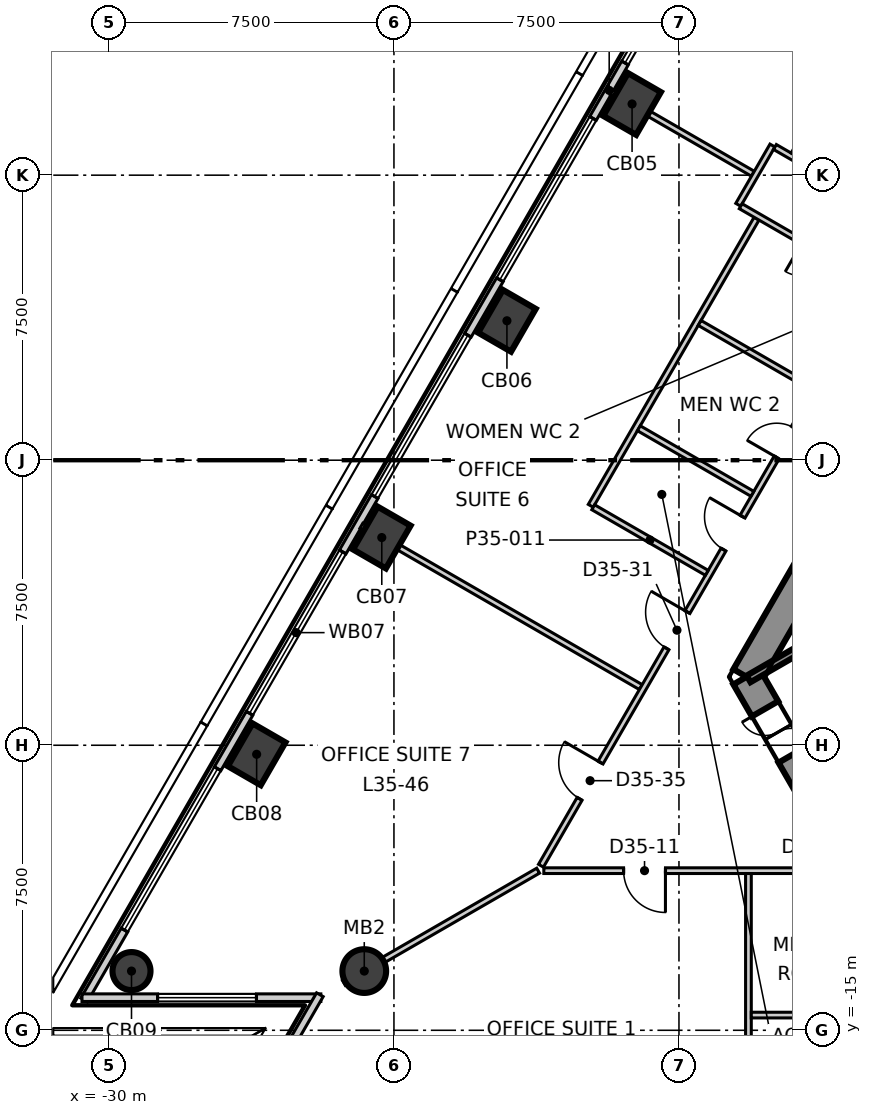
"""IFC4 building model, lengths in metres.
Left out: names, types, materials, properties, quantities, classifications, styles, units other than length and angle.
Written with IfcOpenShell. Run it as: python <this file> out.ifc"""

import sys

from ifc_helpers import new_model, si_unit, direction, frame, frame_2d, origin, origin_2d, place, context, subcontext, project, spatial, polyline, rectangle, circle, outline, extrude, element, fill, save


model = new_model("IFC4")
c1 = context("Model", 3, precision=1e-05, world=origin(), true_north=direction((0.0, 1.0)))
c2 = subcontext(c1, "Body", "Model", "MODEL_VIEW")
j1 = project(units=[si_unit("LENGTHUNIT", "METRE"), si_unit("PLANEANGLEUNIT", "RADIAN")], contexts=[c1])
p1 = place(None, origin())
s1 = spatial("IfcSite", under=j1, at=p1, CompositionType="ELEMENT")
p2 = place(p1, origin())
s2 = spatial("IfcBuilding", under=s1, at=p2, CompositionType="ELEMENT")
p3 = place(p2, frame((0.0, 0.0, 152.3)))
s3 = spatial("IfcBuildingStorey", under=s2, at=p3, CompositionType="ELEMENT", Elevation=152.3)
p4 = place(p3, frame((-1.674, 14.3, -0.3), z_axis=(0.0, 0.0, 1.0), x_axis=(-0.499995765644, -0.866027848477, 0.0)))
e1 = element("IfcWall", 1, at=p4, inside=s3, PredefinedType="SHEAR", context=c2, shape_type="SweptSolid", body=[
    extrude(outline(polyline([(-0.231, -0.4), (1.732, -0.4), (3.695, -0.4), (5.658, -0.4), (7.621, -0.4), (9.584, -0.4), (11.547, -0.4), (13.51, -0.4), (15.473, -0.4), (17.436, -0.4), (19.399, -0.4), (21.362, -0.4), (23.325, -0.4), (22.863, 0.4), (20.977, 0.4), (19.091, 0.4), (17.205, 0.4), (15.319, 0.4), (13.433, 0.4), (11.547, 0.4), (9.661, 0.4), (7.775, 0.4), (5.889, 0.4), (4.003, 0.4), (2.117, 0.4), (0.231, 0.4), (-0.231, -0.4)])), origin(), (0.0, 0.0, 1.0), 4.0),
])
p5 = place(p4, frame((10.997, 0.0, 0.3)))
e2 = element("IfcOpeningElement", 2, at=p5, cuts=e1, PredefinedType="OPENING", context=c2, shape_type="SweptSolid", body=[
    extrude(rectangle(XDim=1.1, YDim=2.1, at=frame_2d((0.55, 1.05))), frame((0.0, 0.41, 0.0), z_axis=(0.0, -1.0, 0.0), x_axis=(1.0, 0.0, 0.0)), (0.0, 0.0, 1.0), 0.82),
])
p6 = place(p4, frame((4.474, 0.0, 0.3)))
e3 = element("IfcOpeningElement", 3, at=p6, cuts=e1, PredefinedType="OPENING", context=c2, shape_type="SweptSolid", body=[
    extrude(rectangle(XDim=0.9, YDim=2.1, at=frame_2d((0.45, 1.05))), frame((0.0, 0.41, 0.0), z_axis=(0.0, -1.0, 0.0), x_axis=(1.0, 0.0, 0.0)), (0.0, 0.0, 1.0), 0.82),
])
p7 = place(p3, frame((-13.221, -5.7, -0.3), z_axis=(0.0, 0.0, 1.0), x_axis=(0.49987182685, -0.866099391942, 0.0)))
e4 = element("IfcWall", 4, at=p7, inside=s3, PredefinedType="SHEAR", context=c2, shape_type="SweptSolid", body=[
    extrude(outline(polyline([(-0.231, -0.4), (1.674, -0.4), (3.579, -0.4), (3.118, 0.4), (1.674, 0.4), (0.231, 0.4), (-0.231, -0.4)])), origin(), (0.0, 0.0, 1.0), 4.0),
])
p8 = place(p7, frame((0.974, 0.0, 0.3)))
e5 = element("IfcOpeningElement", 5, at=p8, cuts=e4, PredefinedType="OPENING", context=c2, shape_type="SweptSolid", body=[
    extrude(rectangle(XDim=1.4, YDim=2.1, at=frame_2d((0.7, 1.05))), frame((0.0, 0.41, 0.0), z_axis=(0.0, -1.0, 0.0), x_axis=(1.0, 0.0, 0.0)), (0.0, 0.0, 1.0), 0.82),
])
for number, where, z_axis, x_axis in (
    (6, (-16.234, 9.373, -0.3), (0.0, 0.0, 1.0), (0.5, 0.866, 0.0)),
    (7, (-19.527, 3.669, -0.3), (0.0, 0.0, 1.0), (0.5, 0.866, 0.0)),
    (8, (-22.82, -2.035, -0.3), (0.0, 0.0, 1.0), (0.5, 0.866, 0.0)),
    (9, (-26.113, -7.738, -0.3), (0.0, 0.0, 1.0), (0.5, 0.866, 0.0)),
):
    element("IfcColumn", number, at=place(p3, frame(where, z_axis=z_axis, x_axis=x_axis)), inside=s3, PredefinedType="COLUMN", context=c2, shape_type="SweptSolid", body=[
        extrude(rectangle(XDim=1.3, YDim=1.0, at=origin_2d()), origin(), (0.0, 0.0, 1.0), 4.0),
    ])
p9 = place(p3, frame((-29.406, -13.442, -0.3), z_axis=(0.0, 0.0, 1.0), x_axis=(0.5, 0.866025403784, 0.0)))
e10 = element("IfcColumn", 10, at=p9, inside=s3, PredefinedType="COLUMN", context=c2, shape_type="SweptSolid", body=[
    extrude(circle(Radius=0.5, at=origin_2d()), origin(), (0.0, 0.0, 1.0), 4.0),
])
p10 = place(p3, frame((-23.281, -13.442, -0.3), z_axis=(0.0, 0.0, 1.0), x_axis=(1.0, 0.0, 0.0)))
e11 = element("IfcColumn", 11, at=p10, inside=s3, PredefinedType="COLUMN", context=c2, shape_type="SweptSolid", body=[
    extrude(circle(Radius=0.575, at=origin_2d()), origin(), (0.0, 0.0, 1.0), 4.0),
])
p11 = place(p3, frame((-3.018, 33.666, 0.0), z_axis=(0.0, 0.0, 1.0), x_axis=(-0.499984613623, -0.866034286931, 0.0)))
e12 = element("IfcWall", 12, at=p11, inside=s3, PredefinedType="ELEMENTEDWALL", context=c2, shape_type="SweptSolid", body=[
    extrude(rectangle(XDim=55.274, YDim=0.2, at=frame_2d((27.637, 0.0))), origin(), (0.0, 0.0, 1.0), 3.7),
])
p12 = place(p11, frame((2.145, 0.0, 0.9)))
e13 = element("IfcOpeningElement", 13, at=p12, cuts=e12, PredefinedType="OPENING", context=c2, shape_type="SweptSolid", body=[
    extrude(rectangle(XDim=4.9, YDim=2.5, at=frame_2d((2.45, 1.25))), frame((0.0, 0.11, 0.0), z_axis=(0.0, -1.0, 0.0), x_axis=(1.0, 0.0, 0.0)), (0.0, 0.0, 1.0), 0.22),
])
p13 = place(p11, frame((8.731, 0.0, 0.9)))
e14 = element("IfcOpeningElement", 14, at=p13, cuts=e12, PredefinedType="OPENING", context=c2, shape_type="SweptSolid", body=[
    extrude(rectangle(XDim=4.9, YDim=2.5, at=frame_2d((2.45, 1.25))), frame((0.0, 0.11, 0.0), z_axis=(0.0, -1.0, 0.0), x_axis=(1.0, 0.0, 0.0)), (0.0, 0.0, 1.0), 0.22),
])
p14 = place(p11, frame((15.318, 0.0, 0.9)))
e15 = element("IfcOpeningElement", 15, at=p14, cuts=e12, PredefinedType="OPENING", context=c2, shape_type="SweptSolid", body=[
    extrude(rectangle(XDim=4.9, YDim=2.5, at=frame_2d((2.45, 1.25))), frame((0.0, 0.11, 0.0), z_axis=(0.0, -1.0, 0.0), x_axis=(1.0, 0.0, 0.0)), (0.0, 0.0, 1.0), 0.22),
])
p15 = place(p11, frame((21.904, 0.0, 0.9)))
e16 = element("IfcOpeningElement", 16, at=p15, cuts=e12, PredefinedType="OPENING", context=c2, shape_type="SweptSolid", body=[
    extrude(rectangle(XDim=4.9, YDim=2.5, at=frame_2d((2.45, 1.25))), frame((0.0, 0.11, 0.0), z_axis=(0.0, -1.0, 0.0), x_axis=(1.0, 0.0, 0.0)), (0.0, 0.0, 1.0), 0.22),
])
p16 = place(p11, frame((28.49, 0.0, 0.9)))
e17 = element("IfcOpeningElement", 17, at=p16, cuts=e12, PredefinedType="OPENING", context=c2, shape_type="SweptSolid", body=[
    extrude(rectangle(XDim=4.9, YDim=2.5, at=frame_2d((2.45, 1.25))), frame((0.0, 0.11, 0.0), z_axis=(0.0, -1.0, 0.0), x_axis=(1.0, 0.0, 0.0)), (0.0, 0.0, 1.0), 0.22),
])
p17 = place(p11, frame((35.076, 0.0, 0.9)))
e18 = element("IfcOpeningElement", 18, at=p17, cuts=e12, PredefinedType="OPENING", context=c2, shape_type="SweptSolid", body=[
    extrude(rectangle(XDim=4.9, YDim=2.5, at=frame_2d((2.45, 1.25))), frame((0.0, 0.11, 0.0), z_axis=(0.0, -1.0, 0.0), x_axis=(1.0, 0.0, 0.0)), (0.0, 0.0, 1.0), 0.22),
])
p18 = place(p11, frame((41.662, 0.0, 0.9)))
e19 = element("IfcOpeningElement", 19, at=p18, cuts=e12, PredefinedType="OPENING", context=c2, shape_type="SweptSolid", body=[
    extrude(rectangle(XDim=4.9, YDim=2.5, at=frame_2d((2.45, 1.25))), frame((0.0, 0.11, 0.0), z_axis=(0.0, -1.0, 0.0), x_axis=(1.0, 0.0, 0.0)), (0.0, 0.0, 1.0), 0.22),
])
p19 = place(p11, frame((48.248, 0.0, 0.9)))
e20 = element("IfcOpeningElement", 20, at=p19, cuts=e12, PredefinedType="OPENING", context=c2, shape_type="SweptSolid", body=[
    extrude(rectangle(XDim=4.9, YDim=2.5, at=frame_2d((2.45, 1.25))), frame((0.0, 0.11, 0.0), z_axis=(0.0, -1.0, 0.0), x_axis=(1.0, 0.0, 0.0)), (0.0, 0.0, 1.0), 0.22),
])
p20 = place(p3, frame((-30.709, -14.142, 0.0), z_axis=(0.0, 0.0, 1.0), x_axis=(1.0, 0.0, 0.0)))
e21 = element("IfcWall", 21, at=p20, inside=s3, PredefinedType="ELEMENTEDWALL", context=c2, shape_type="SweptSolid", body=[
    extrude(rectangle(XDim=6.285, YDim=0.2, at=frame_2d((3.143, 0.0))), origin(), (0.0, 0.0, 1.0), 3.7),
])
p21 = place(p20, frame((1.99, 0.0, 0.9)))
e22 = element("IfcOpeningElement", 22, at=p21, cuts=e21, PredefinedType="OPENING", context=c2, shape_type="SweptSolid", body=[
    extrude(rectangle(XDim=2.6, YDim=2.5, at=frame_2d((1.3, 1.25))), frame((0.0, 0.11, 0.0), z_axis=(0.0, -1.0, 0.0), x_axis=(1.0, 0.0, 0.0)), (0.0, 0.0, 1.0), 0.22),
])
p22 = place(p3, frame((-24.449, -14.064, 0.0), z_axis=(0.0, 0.0, 1.0), x_axis=(-0.500057556061, -0.865992171227, 0.0)))
e23 = element("IfcWall", 23, at=p22, inside=s3, PredefinedType="ELEMENTEDWALL", context=c2, shape_type="SweptSolid", body=[
    extrude(rectangle(XDim=6.285, YDim=0.2, at=frame_2d((3.143, 0.0))), origin(), (0.0, 0.0, 1.0), 3.7),
])
p23 = place(p22, frame((1.39, 0.0, 0.9)))
e24 = element("IfcOpeningElement", 24, at=p23, cuts=e23, PredefinedType="OPENING", context=c2, shape_type="SweptSolid", body=[
    extrude(rectangle(XDim=2.6, YDim=2.5, at=frame_2d((1.3, 1.25))), frame((0.0, 0.11, 0.0), z_axis=(0.0, -1.0, 0.0), x_axis=(1.0, 0.0, 0.0)), (0.0, 0.0, 1.0), 0.22),
])
p24 = place(p3, frame((-23.818, -13.752, 0.0), z_axis=(0.0, 0.0, 1.0), x_axis=(0.8659920435, 0.500057777256, 0.0)))
e25 = element("IfcWall", 25, at=p24, inside=s3, PredefinedType="PARTITIONING", context=c2, shape_type="SweptSolid", body=[
    extrude(rectangle(XDim=5.903, YDim=0.15, at=frame_2d((2.952, 0.0))), origin(), (0.0, 0.0, 1.0), 3.2),
])
p25 = place(p3, frame((-23.357, -1.725, 0.0), z_axis=(0.0, 0.0, 1.0), x_axis=(0.866045766046, -0.49996472987, 0.0)))
e26 = element("IfcWall", 26, at=p25, inside=s3, PredefinedType="PARTITIONING", context=c2, shape_type="SweptSolid", body=[
    extrude(rectangle(XDim=8.49, YDim=0.15, at=frame_2d((4.245, 0.0))), origin(), (0.0, 0.0, 1.0), 3.7),
])
p26 = place(p3, frame((-18.556, -10.8, 0.0), z_axis=(0.0, 0.0, 1.0), x_axis=(1.0, 0.0, 0.0)))
e27 = element("IfcWall", 27, at=p26, inside=s3, PredefinedType="PARTITIONING", context=c2, shape_type="SweptSolid", body=[
    extrude(rectangle(XDim=17.655, YDim=0.15, at=frame_2d((8.828, 0.0))), origin(), (0.0, 0.0, 1.0), 3.7),
])
p27 = place(p26, frame((2.1, 0.0, 0.0)))
e28 = element("IfcOpeningElement", 28, at=p27, cuts=e27, PredefinedType="OPENING", context=c2, shape_type="SweptSolid", body=[
    extrude(rectangle(XDim=1.1, YDim=2.1, at=frame_2d((0.55, 1.05))), frame((0.0, 0.085, 0.0), z_axis=(0.0, -1.0, 0.0), x_axis=(1.0, 0.0, 0.0)), (0.0, 0.0, 1.0), 0.17),
])
p28 = place(p26, frame((13.934, 0.0, 0.0)))
e29 = element("IfcOpeningElement", 29, at=p28, cuts=e27, PredefinedType="OPENING", context=c2, shape_type="SweptSolid", body=[
    extrude(rectangle(XDim=1.1, YDim=2.1, at=frame_2d((0.55, 1.05))), frame((0.0, 0.085, 0.0), z_axis=(0.0, -1.0, 0.0), x_axis=(1.0, 0.0, 0.0)), (0.0, 0.0, 1.0), 0.17),
])
p29 = place(p26, frame((6.734, 0.0, 0.0)))
e30 = element("IfcOpeningElement", 30, at=p29, cuts=e27, PredefinedType="OPENING", context=c2, shape_type="SweptSolid", body=[
    extrude(rectangle(XDim=0.9, YDim=2.1, at=frame_2d((0.45, 1.05))), frame((0.0, 0.085, 0.0), z_axis=(0.0, -1.0, 0.0), x_axis=(1.0, 0.0, 0.0)), (0.0, 0.0, 1.0), 0.17),
])
p30 = place(p26, frame((9.734, 0.0, 0.0)))
e31 = element("IfcOpeningElement", 31, at=p30, cuts=e27, PredefinedType="OPENING", context=c2, shape_type="SweptSolid", body=[
    extrude(rectangle(XDim=0.9, YDim=2.1, at=frame_2d((0.45, 1.05))), frame((0.0, 0.085, 0.0), z_axis=(0.0, -1.0, 0.0), x_axis=(1.0, 0.0, 0.0)), (0.0, 0.0, 1.0), 0.17),
])
p31 = place(p3, frame((-18.631, -10.67, 0.0), z_axis=(0.0, 0.0, 1.0), x_axis=(0.500017706633, 0.866015180614, 0.0)))
e32 = element("IfcWall", 32, at=p31, inside=s3, PredefinedType="PARTITIONING", context=c2, shape_type="SweptSolid", body=[
    extrude(rectangle(XDim=17.656, YDim=0.15, at=frame_2d((8.828, 0.0))), origin(), (0.0, 0.0, 1.0), 3.7),
])
p32 = place(p31, frame((6.606, 0.0, 0.0)))
e33 = element("IfcOpeningElement", 33, at=p32, cuts=e32, PredefinedType="OPENING", context=c2, shape_type="SweptSolid", body=[
    extrude(rectangle(XDim=1.1, YDim=2.1, at=frame_2d((0.55, 1.05))), frame((0.0, 0.085, 0.0), z_axis=(0.0, -1.0, 0.0), x_axis=(1.0, 0.0, 0.0)), (0.0, 0.0, 1.0), 0.17),
])
p33 = place(p31, frame((12.406, 0.0, 0.0)))
e34 = element("IfcOpeningElement", 34, at=p33, cuts=e32, PredefinedType="OPENING", context=c2, shape_type="SweptSolid", body=[
    extrude(rectangle(XDim=0.9, YDim=2.1, at=frame_2d((0.45, 1.05))), frame((0.0, 0.085, 0.0), z_axis=(0.0, -1.0, 0.0), x_axis=(1.0, 0.0, 0.0)), (0.0, 0.0, 1.0), 0.17),
])
p34 = place(p31, frame((9.606, 0.0, 0.0)))
e35 = element("IfcOpeningElement", 35, at=p34, cuts=e32, PredefinedType="OPENING", context=c2, shape_type="SweptSolid", body=[
    extrude(rectangle(XDim=1.0, YDim=2.1, at=frame_2d((0.5, 1.05))), frame((0.0, 0.085, 0.0), z_axis=(0.0, -1.0, 0.0), x_axis=(1.0, 0.0, 0.0)), (0.0, 0.0, 1.0), 0.17),
])
p35 = place(p31, frame((2.034, 0.0, 0.0)))
e36 = element("IfcOpeningElement", 36, at=p35, cuts=e32, PredefinedType="OPENING", context=c2, shape_type="SweptSolid", body=[
    extrude(rectangle(XDim=1.1, YDim=2.1, at=frame_2d((0.55, 1.05))), frame((0.0, 0.085, 0.0), z_axis=(0.0, -1.0, 0.0), x_axis=(1.0, 0.0, 0.0)), (0.0, 0.0, 1.0), 0.17),
])
p36 = place(p3, frame((-16.771, 9.683, 0.0), z_axis=(0.0, 0.0, 1.0), x_axis=(0.866070942811, -0.499921115796, 0.0)))
e37 = element("IfcWall", 37, at=p36, inside=s3, PredefinedType="PARTITIONING", context=c2, shape_type="SweptSolid", body=[
    extrude(rectangle(XDim=4.291, YDim=0.15, at=frame_2d((2.146, 0.0))), origin(), (0.0, 0.0, 1.0), 3.2),
])
p37 = place(p3, frame((-17.321, -1.2, 0.0), z_axis=(0.0, 0.0, 1.0), x_axis=(0.500054279689, 0.865994063124, 0.0)))
e38 = element("IfcWall", 38, at=p37, inside=s3, PredefinedType="PARTITIONING", context=c2, shape_type="SweptSolid", body=[
    extrude(rectangle(XDim=8.725, YDim=0.15, at=frame_2d((4.363, 0.0))), origin(), (0.0, 0.0, 1.0), 3.7),
])
p38 = place(p3, frame((-17.256, -1.238, 0.0), z_axis=(0.0, 0.0, 1.0), x_axis=(0.866061862632, -0.499936846106, 0.0)))
e39 = element("IfcWall", 39, at=p38, inside=s3, PredefinedType="PARTITIONING", context=c2, shape_type="SweptSolid", body=[
    extrude(rectangle(XDim=3.45, YDim=0.15, at=frame_2d((1.725, 0.0))), origin(), (0.0, 0.0, 1.0), 3.7),
])
p39 = place(p3, frame((-16.056, 0.841, 0.0), z_axis=(0.0, 0.0, 1.0), x_axis=(0.866013532718, -0.500020560727, 0.0)))
e40 = element("IfcWall", 40, at=p39, inside=s3, PredefinedType="PARTITIONING", context=c2, shape_type="SweptSolid", body=[
    extrude(rectangle(XDim=3.45, YDim=0.15, at=frame_2d((1.725, 0.0))), origin(), (0.0, 0.0, 1.0), 3.7),
])
p40 = place(p3, frame((-14.456, 3.612, 0.0), z_axis=(0.0, 0.0, 1.0), x_axis=(0.866031223622, -0.49998991961, 0.0)))
e41 = element("IfcWall", 41, at=p40, inside=s3, PredefinedType="PARTITIONING", context=c2, shape_type="SweptSolid", body=[
    extrude(rectangle(XDim=3.45, YDim=0.15, at=frame_2d((1.725, 0.0))), origin(), (0.0, 0.0, 1.0), 3.7),
])
p41 = place(p3, frame((-13.172, -19.366, 0.0), z_axis=(0.0, 0.0, 1.0), x_axis=(0.0, 1.0, 0.0)))
e42 = element("IfcWall", 42, at=p41, inside=s3, PredefinedType="PARTITIONING", context=c2, shape_type="SweptSolid", body=[
    extrude(rectangle(XDim=8.491, YDim=0.15, at=frame_2d((4.246, 0.0))), origin(), (0.0, 0.0, 1.0), 3.7),
])
p42 = place(p3, frame((-13.097, -14.6, 0.0), z_axis=(0.0, 0.0, 1.0), x_axis=(1.0, 0.0, 0.0)))
e43 = element("IfcWall", 43, at=p42, inside=s3, PredefinedType="PARTITIONING", context=c2, shape_type="SweptSolid", body=[
    extrude(rectangle(XDim=3.525, YDim=0.15, at=frame_2d((1.762, 0.0))), origin(), (0.0, 0.0, 1.0), 3.7),
])
p43 = place(p3, frame((-13.44, 6.721, 0.0), z_axis=(0.0, 0.0, 1.0), x_axis=(0.499902469156, 0.866081705922, 0.0)))
e44 = element("IfcWall", 44, at=p43, inside=s3, PredefinedType="PARTITIONING", context=c2, shape_type="SweptSolid", body=[
    extrude(rectangle(XDim=1.8, YDim=0.15, at=frame_2d((0.9, 0.0))), origin(), (0.0, 0.0, 1.0), 3.7),
])
p44 = place(p3, frame((-12.475, 8.242, 0.0), z_axis=(0.0, 0.0, 1.0), x_axis=(0.866060059865, -0.499939969103, 0.0)))
e45 = element("IfcWall", 45, at=p44, inside=s3, PredefinedType="PARTITIONING", context=c2, shape_type="SweptSolid", body=[
    extrude(rectangle(XDim=4.048, YDim=0.15, at=frame_2d((2.024, 0.0))), origin(), (0.0, 0.0, 1.0), 3.7),
])
p45 = place(p3, frame((-13.375, 6.683, 0.0), z_axis=(0.0, 0.0, 1.0), x_axis=(0.866033948129, -0.499985200469, 0.0)))
e46 = element("IfcWall", 46, at=p45, inside=s3, PredefinedType="PARTITIONING", context=c2, shape_type="SweptSolid", body=[
    extrude(rectangle(XDim=4.048, YDim=0.15, at=frame_2d((2.024, 0.0))), origin(), (0.0, 0.0, 1.0), 3.7),
])
p46 = place(p45, frame((1.875, 0.0, 0.0)))
e47 = element("IfcOpeningElement", 47, at=p46, cuts=e46, PredefinedType="OPENING", context=c2, shape_type="SweptSolid", body=[
    extrude(rectangle(XDim=0.9, YDim=2.1, at=frame_2d((0.45, 1.05))), frame((0.0, 0.085, 0.0), z_axis=(0.0, -1.0, 0.0), x_axis=(1.0, 0.0, 0.0)), (0.0, 0.0, 1.0), 0.17),
])
p47 = place(p3, frame((-11.983, 8.045, 0.0), z_axis=(0.0, 0.0, 1.0), x_axis=(0.49998396455, 0.866034661658, 0.0)))
e48 = element("IfcWall", 48, at=p47, inside=s3, PredefinedType="PARTITIONING", context=c2, shape_type="SweptSolid", body=[
    extrude(rectangle(XDim=12.122, YDim=0.15, at=frame_2d((6.061, 0.0))), origin(), (0.0, 0.0, 1.0), 3.7),
])
p48 = place(p47, frame((5.547, 0.0, 0.0)))
e49 = element("IfcOpeningElement", 49, at=p48, cuts=e48, PredefinedType="OPENING", context=c2, shape_type="SweptSolid", body=[
    extrude(rectangle(XDim=1.0, YDim=2.1, at=frame_2d((0.5, 1.05))), frame((0.0, 0.085, 0.0), z_axis=(0.0, -1.0, 0.0), x_axis=(1.0, 0.0, 0.0)), (0.0, 0.0, 1.0), 0.17),
])
p49 = place(p3, frame((-13.167, -5.754, 0.0), z_axis=(0.0, 0.0, 1.0), x_axis=(0.866060938598, 0.499938446846, 0.0)))
e50 = element("IfcWall", 50, at=p49, inside=s3, PredefinedType="SOLIDWALL", context=c2, shape_type="SweptSolid", body=[
    extrude(rectangle(XDim=7.665, YDim=0.2, at=frame_2d((3.832, 0.0))), origin(), (0.0, 0.0, 1.0), 3.7),
])
p50 = place(p15, origin())
e51 = element("IfcWindow", 51, at=p50, inside=s3, PartitioningType="SINGLE_PANEL", PredefinedType="WINDOW", context=c2, shape_type="SweptSolid", body=[
    extrude(rectangle(XDim=4.9, YDim=2.5, at=frame_2d((2.45, 1.25))), frame((0.0, 0.03, 0.0), z_axis=(0.0, -1.0, 0.0), x_axis=(1.0, 0.0, 0.0)), (0.0, 0.0, 1.0), 0.06),
])
fill(e16, e51)
p51 = place(p16, origin())
e52 = element("IfcWindow", 52, at=p51, inside=s3, PartitioningType="SINGLE_PANEL", PredefinedType="WINDOW", context=c2, shape_type="SweptSolid", body=[
    extrude(rectangle(XDim=4.9, YDim=2.5, at=frame_2d((2.45, 1.25))), frame((0.0, 0.03, 0.0), z_axis=(0.0, -1.0, 0.0), x_axis=(1.0, 0.0, 0.0)), (0.0, 0.0, 1.0), 0.06),
])
fill(e17, e52)
p52 = place(p17, origin())
e53 = element("IfcWindow", 53, at=p52, inside=s3, PartitioningType="SINGLE_PANEL", PredefinedType="WINDOW", context=c2, shape_type="SweptSolid", body=[
    extrude(rectangle(XDim=4.9, YDim=2.5, at=frame_2d((2.45, 1.25))), frame((0.0, 0.03, 0.0), z_axis=(0.0, -1.0, 0.0), x_axis=(1.0, 0.0, 0.0)), (0.0, 0.0, 1.0), 0.06),
])
fill(e18, e53)
p53 = place(p18, origin())
e54 = element("IfcWindow", 54, at=p53, inside=s3, PartitioningType="SINGLE_PANEL", PredefinedType="WINDOW", context=c2, shape_type="SweptSolid", body=[
    extrude(rectangle(XDim=4.9, YDim=2.5, at=frame_2d((2.45, 1.25))), frame((0.0, 0.03, 0.0), z_axis=(0.0, -1.0, 0.0), x_axis=(1.0, 0.0, 0.0)), (0.0, 0.0, 1.0), 0.06),
])
fill(e19, e54)
p54 = place(p19, origin())
e55 = element("IfcWindow", 55, at=p54, inside=s3, PartitioningType="SINGLE_PANEL", PredefinedType="WINDOW", context=c2, shape_type="SweptSolid", body=[
    extrude(rectangle(XDim=4.9, YDim=2.5, at=frame_2d((2.45, 1.25))), frame((0.0, 0.03, 0.0), z_axis=(0.0, -1.0, 0.0), x_axis=(1.0, 0.0, 0.0)), (0.0, 0.0, 1.0), 0.06),
])
fill(e20, e55)
p55 = place(p21, origin())
e56 = element("IfcWindow", 56, at=p55, inside=s3, PartitioningType="SINGLE_PANEL", PredefinedType="WINDOW", context=c2, shape_type="SweptSolid", body=[
    extrude(rectangle(XDim=2.6, YDim=2.5, at=frame_2d((1.3, 1.25))), frame((0.0, 0.03, 0.0), z_axis=(0.0, -1.0, 0.0), x_axis=(1.0, 0.0, 0.0)), (0.0, 0.0, 1.0), 0.06),
])
fill(e22, e56)
p56 = place(p27, origin())
e57 = element("IfcDoor", 57, at=p56, inside=s3, OperationType="SINGLE_SWING_RIGHT", PredefinedType="DOOR", context=c2, shape_type="SweptSolid", body=[
    extrude(rectangle(XDim=1.1, YDim=2.1, at=frame_2d((0.55, 1.05))), frame((0.0, 0.025, 0.0), z_axis=(0.0, -1.0, 0.0), x_axis=(1.0, 0.0, 0.0)), (0.0, 0.0, 1.0), 0.05),
])
fill(e28, e57)
p57 = place(p32, origin())
e58 = element("IfcDoor", 58, at=p57, inside=s3, OperationType="SINGLE_SWING_LEFT", PredefinedType="DOOR", context=c2, shape_type="SweptSolid", body=[
    extrude(rectangle(XDim=1.1, YDim=2.1, at=frame_2d((0.55, 1.05))), frame((0.0, 0.025, 0.0), z_axis=(0.0, -1.0, 0.0), x_axis=(1.0, 0.0, 0.0)), (0.0, 0.0, 1.0), 0.05),
])
fill(e33, e58)
p58 = place(p33, origin())
e59 = element("IfcDoor", 59, at=p58, inside=s3, OperationType="SINGLE_SWING_RIGHT", PredefinedType="DOOR", context=c2, shape_type="SweptSolid", body=[
    extrude(rectangle(XDim=0.9, YDim=2.1, at=frame_2d((0.45, 1.05))), frame((0.0, 0.025, 0.0), z_axis=(0.0, -1.0, 0.0), x_axis=(1.0, 0.0, 0.0)), (0.0, 0.0, 1.0), 0.05),
])
fill(e34, e59)
p59 = place(p34, origin())
e60 = element("IfcDoor", 60, at=p59, inside=s3, OperationType="SINGLE_SWING_LEFT", PredefinedType="DOOR", context=c2, shape_type="SweptSolid", body=[
    extrude(rectangle(XDim=1.0, YDim=2.1, at=frame_2d((0.5, 1.05))), frame((0.0, 0.025, 0.0), z_axis=(0.0, -1.0, 0.0), x_axis=(1.0, 0.0, 0.0)), (0.0, 0.0, 1.0), 0.05),
])
fill(e35, e60)
p60 = place(p35, origin())
e61 = element("IfcDoor", 61, at=p60, inside=s3, OperationType="SINGLE_SWING_LEFT", PredefinedType="DOOR", context=c2, shape_type="SweptSolid", body=[
    extrude(rectangle(XDim=1.1, YDim=2.1, at=frame_2d((0.55, 1.05))), frame((0.0, 0.025, 0.0), z_axis=(0.0, -1.0, 0.0), x_axis=(1.0, 0.0, 0.0)), (0.0, 0.0, 1.0), 0.05),
])
fill(e36, e61)
p61 = place(p8, origin())
e62 = element("IfcDoor", 62, at=p61, inside=s3, OperationType="DOUBLE_DOOR_SINGLE_SWING", PredefinedType="DOOR", context=c2, shape_type="SweptSolid", body=[
    extrude(rectangle(XDim=1.4, YDim=2.1, at=frame_2d((0.7, 1.05))), frame((0.0, 0.025, 0.0), z_axis=(0.0, -1.0, 0.0), x_axis=(1.0, 0.0, 0.0)), (0.0, 0.0, 1.0), 0.05),
])
fill(e5, e62)
save(model, sys.argv[1])
